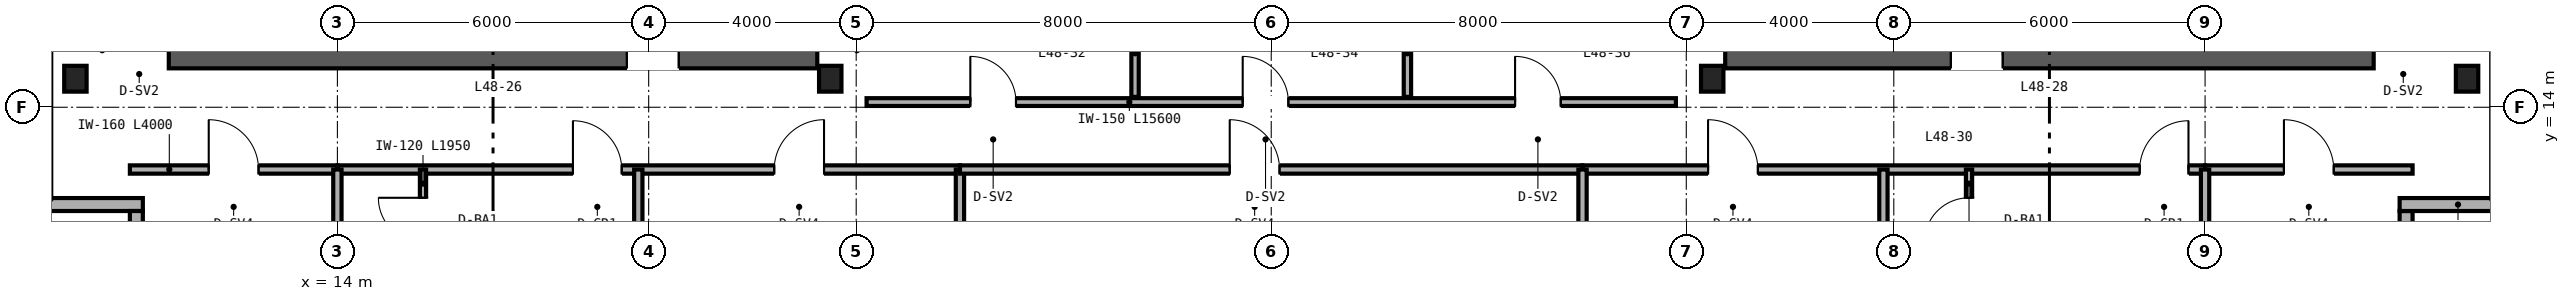
"""IFC4 building model, lengths in metres.
Left out: names, types, materials, properties, quantities, classifications, styles, units other than length and angle.
Written with IfcOpenShell. Run it as: python <this file> out.ifc"""

import sys

from ifc_helpers import new_model, si_unit, direction, frame, frame_2d, origin, origin_2d, place, context, subcontext, project, spatial, rectangle, i_section, extrude, source, transform, mapped, element, fill, save


model = new_model("IFC4")
c1 = context("Model", 3, precision=1e-05, world=origin(), true_north=direction((0.0, 1.0)))
c2 = subcontext(c1, "Body", "Model", "MODEL_VIEW")
j1 = project(units=[si_unit("LENGTHUNIT", "METRE"), si_unit("PLANEANGLEUNIT", "RADIAN")], contexts=[c1])
p1 = place(None, origin())
s1 = spatial("IfcSite", under=j1, at=p1, CompositionType="ELEMENT")
p2 = place(p1, origin())
s2 = spatial("IfcBuilding", under=s1, at=p2, CompositionType="ELEMENT")
p3 = place(p2, frame((0.0, 0.0, 192.0)))
s3 = spatial("IfcBuildingStorey", under=s2, at=p3, CompositionType="ELEMENT", Elevation=192.0)
p4 = place(p3, frame((10.75, 15.0, 0.0), z_axis=(0.0, 0.0, 1.0), x_axis=(1.0, 0.0, 0.0)))
e1 = element("IfcWall", 1, at=p4, inside=s3, PredefinedType="SHEAR", context=c2, shape_type="SweptSolid", body=[
    extrude(rectangle(XDim=12.5, YDim=0.5, at=frame_2d((6.25, 0.0))), origin(), (0.0, 0.0, 1.0), 3.37),
])
p5 = place(p4, frame((8.83, 0.0, 0.0)))
e2 = element("IfcOpeningElement", 2, at=p5, cuts=e1, PredefinedType="OPENING", context=c2, shape_type="SweptSolid", body=[
    extrude(rectangle(XDim=1.0, YDim=2.15, at=frame_2d((0.5, 1.075))), frame((0.0, 0.26, 0.0), z_axis=(0.0, -1.0, 0.0), x_axis=(1.0, 0.0, 0.0)), (0.0, 0.0, 1.0), 0.52),
])
p6 = place(p3, frame((40.75, 15.0, 0.0), z_axis=(0.0, 0.0, 1.0), x_axis=(1.0, 0.0, 0.0)))
e3 = element("IfcWall", 3, at=p6, inside=s3, PredefinedType="SHEAR", context=c2, shape_type="SweptSolid", body=[
    extrude(rectangle(XDim=12.5, YDim=0.5, at=frame_2d((6.25, 0.0))), origin(), (0.0, 0.0, 1.0), 3.37),
])
p7 = place(p6, frame((4.35, 0.0, 0.0)))
e4 = element("IfcOpeningElement", 4, at=p7, cuts=e3, PredefinedType="OPENING", context=c2, shape_type="SweptSolid", body=[
    extrude(rectangle(XDim=1.0, YDim=2.15, at=frame_2d((0.5, 1.075))), frame((0.0, 0.26, 0.0), z_axis=(0.0, -1.0, 0.0), x_axis=(1.0, 0.0, 0.0)), (0.0, 0.0, 1.0), 0.52),
])
m1 = source(origin(), c2, "Body", "SweptSolid", [
    extrude(i_section(OverallWidth=0.432, OverallDepth=0.498, WebThickness=0.056, FlangeThickness=0.089, FilletRadius=0.025, at=origin_2d()), origin(), (0.0, 0.0, 1.0), 3.37),
])
for number, where, z_axis, x_axis in (
    (5, (8.95, 14.55, 0.0), (0.0, 0.0, 1.0), (1.0, 0.0, 0.0)),
    (6, (23.5, 14.55, 0.0), (0.0, 0.0, 1.0), (1.0, 0.0, 0.0)),
    (7, (40.5, 14.55, 0.0), (0.0, 0.0, 1.0), (1.0, 0.0, 0.0)),
    (8, (55.05, 14.55, 0.0), (0.0, 0.0, 1.0), (1.0, 0.0, 0.0)),
):
    element("IfcColumn", number, at=place(p3, frame(where, z_axis=z_axis, x_axis=x_axis)), inside=s3, PredefinedType="COLUMN", context=c2, shape_type="MappedRepresentation", body=[
        mapped(m1, transform((0.0, 0.0, 0.0), scale=1.0)),
    ])
p8 = place(p3, frame((53.875, 10.0, 0.0), z_axis=(0.0, 0.0, 1.0), x_axis=(0.0, 1.0, 0.0)))
e9 = element("IfcWall", 9, at=p8, inside=s3, PredefinedType="SOLIDWALL", context=c2, shape_type="SweptSolid", body=[
    extrude(rectangle(XDim=2.0, YDim=0.25, at=frame_2d((1.0, 0.0))), origin(), (0.0, 0.0, 1.0), 3.37),
])
for number, where, z_axis, x_axis in (
    (10, (53.75, 12.125, 0.0), (0.0, 0.0, 1.0), (1.0, 0.0, 0.0)),
    (11, (8.0, 12.125, 0.0), (0.0, 0.0, 1.0), (1.0, 0.0, 0.0)),
):
    element("IfcWall", number, at=place(p3, frame(where, z_axis=z_axis, x_axis=x_axis)), inside=s3, PredefinedType="SOLIDWALL", context=c2, shape_type="SweptSolid", body=[
        extrude(rectangle(XDim=2.25, YDim=0.25, at=frame_2d((1.125, 0.0))), origin(), (0.0, 0.0, 1.0), 3.37),
    ])
p9 = place(p3, frame((10.125, 12.0, 0.0), z_axis=(0.0, 0.0, 1.0), x_axis=(0.0, -1.0, 0.0)))
e12 = element("IfcWall", 12, at=p9, inside=s3, PredefinedType="SOLIDWALL", context=c2, shape_type="SweptSolid", body=[
    extrude(rectangle(XDim=2.0, YDim=0.25, at=frame_2d((1.0, 0.0))), origin(), (0.0, 0.0, 1.0), 3.37),
])
p10 = place(p3, frame((24.2, 14.1, 0.0), z_axis=(0.0, 0.0, 1.0), x_axis=(1.0, 0.0, 0.0)))
e13 = element("IfcWall", 13, at=p10, inside=s3, PredefinedType="PARTITIONING", context=c2, shape_type="SweptSolid", body=[
    extrude(rectangle(XDim=15.6, YDim=0.15, at=frame_2d((7.8, 0.0))), origin(), (0.0, 0.0, 1.0), 3.37),
])
p11 = place(p10, frame((2.0, 0.0, 0.0)))
e14 = element("IfcOpeningElement", 14, at=p11, cuts=e13, PredefinedType="OPENING", context=c2, shape_type="SweptSolid", body=[
    extrude(rectangle(XDim=0.88, YDim=2.15, at=frame_2d((0.44, 1.075))), frame((0.0, 0.085, 0.0), z_axis=(0.0, -1.0, 0.0), x_axis=(1.0, 0.0, 0.0)), (0.0, 0.0, 1.0), 0.17),
])
p12 = place(p10, frame((7.25, 0.0, 0.0)))
e15 = element("IfcOpeningElement", 15, at=p12, cuts=e13, PredefinedType="OPENING", context=c2, shape_type="SweptSolid", body=[
    extrude(rectangle(XDim=0.88, YDim=2.15, at=frame_2d((0.44, 1.075))), frame((0.0, 0.085, 0.0), z_axis=(0.0, -1.0, 0.0), x_axis=(1.0, 0.0, 0.0)), (0.0, 0.0, 1.0), 0.17),
])
p13 = place(p10, frame((12.5, 0.0, 0.0)))
e16 = element("IfcOpeningElement", 16, at=p13, cuts=e13, PredefinedType="OPENING", context=c2, shape_type="SweptSolid", body=[
    extrude(rectangle(XDim=0.88, YDim=2.15, at=frame_2d((0.44, 1.075))), frame((0.0, 0.085, 0.0), z_axis=(0.0, -1.0, 0.0), x_axis=(1.0, 0.0, 0.0)), (0.0, 0.0, 1.0), 0.17),
])
for number, where, z_axis, x_axis in (
    (17, (29.375, 14.2, 0.0), (0.0, 0.0, 1.0), (0.0, 1.0, 0.0)),
    (18, (34.625, 14.2, 0.0), (0.0, 0.0, 1.0), (0.0, 1.0, 0.0)),
):
    element("IfcWall", number, at=place(p3, frame(where, z_axis=z_axis, x_axis=x_axis)), inside=s3, PredefinedType="PARTITIONING", context=c2, shape_type="SweptSolid", body=[
        extrude(rectangle(XDim=1.68, YDim=0.142, at=frame_2d((0.84, 0.0))), origin(), (0.0, 0.0, 1.0), 3.37),
    ])
p14 = place(p3, frame((10.0, 12.8, 0.0), z_axis=(0.0, 0.0, 1.0), x_axis=(1.0, 0.0, 0.0)))
e19 = element("IfcWall", 19, at=p14, inside=s3, PredefinedType="PARTITIONING", context=c2, shape_type="SweptSolid", body=[
    extrude(rectangle(XDim=4.0, YDim=0.16, at=frame_2d((2.0, 0.0))), origin(), (0.0, 0.0, 1.0), 3.37),
])
p15 = place(p14, frame((1.52, 0.0, 0.0)))
e20 = element("IfcOpeningElement", 20, at=p15, cuts=e19, PredefinedType="OPENING", context=c2, shape_type="SweptSolid", body=[
    extrude(rectangle(XDim=0.96, YDim=2.15, at=frame_2d((0.48, 1.075))), frame((0.0, 0.09, 0.0), z_axis=(0.0, -1.0, 0.0), x_axis=(1.0, 0.0, 0.0)), (0.0, 0.0, 1.0), 0.18),
])
p16 = place(p3, frame((50.0, 12.8, 0.0), z_axis=(0.0, 0.0, 1.0), x_axis=(1.0, 0.0, 0.0)))
e21 = element("IfcWall", 21, at=p16, inside=s3, PredefinedType="PARTITIONING", context=c2, shape_type="SweptSolid", body=[
    extrude(rectangle(XDim=4.0, YDim=0.16, at=frame_2d((2.0, 0.0))), origin(), (0.0, 0.0, 1.0), 3.37),
])
p17 = place(p16, frame((1.52, 0.0, 0.0)))
e22 = element("IfcOpeningElement", 22, at=p17, cuts=e21, PredefinedType="OPENING", context=c2, shape_type="SweptSolid", body=[
    extrude(rectangle(XDim=0.96, YDim=2.15, at=frame_2d((0.48, 1.075))), frame((0.0, 0.09, 0.0), z_axis=(0.0, -1.0, 0.0), x_axis=(1.0, 0.0, 0.0)), (0.0, 0.0, 1.0), 0.18),
])
p18 = place(p3, frame((14.0, 12.8, 0.0), z_axis=(0.0, 0.0, 1.0), x_axis=(1.0, 0.0, 0.0)))
e23 = element("IfcWall", 23, at=p18, inside=s3, PredefinedType="PARTITIONING", context=c2, shape_type="SweptSolid", body=[
    extrude(rectangle(XDim=12.0, YDim=0.16, at=frame_2d((6.0, 0.0))), origin(), (0.0, 0.0, 1.0), 2.913),
])
p19 = place(p18, frame((4.54, 0.0, 0.0)))
e24 = element("IfcOpeningElement", 24, at=p19, cuts=e23, PredefinedType="OPENING", context=c2, shape_type="SweptSolid", body=[
    extrude(rectangle(XDim=0.94, YDim=2.15, at=frame_2d((0.47, 1.075))), frame((0.0, 0.09, 0.0), z_axis=(0.0, -1.0, 0.0), x_axis=(1.0, 0.0, 0.0)), (0.0, 0.0, 1.0), 0.18),
])
p20 = place(p18, frame((8.42, 0.0, 0.0)))
e25 = element("IfcOpeningElement", 25, at=p20, cuts=e23, PredefinedType="OPENING", context=c2, shape_type="SweptSolid", body=[
    extrude(rectangle(XDim=0.96, YDim=2.15, at=frame_2d((0.48, 1.075))), frame((0.0, 0.09, 0.0), z_axis=(0.0, -1.0, 0.0), x_axis=(1.0, 0.0, 0.0)), (0.0, 0.0, 1.0), 0.18),
])
p21 = place(p3, frame((14.0, 6.36, 0.0), z_axis=(0.0, 0.0, 1.0), x_axis=(0.0, 1.0, 0.0)))
e26 = element("IfcWall", 26, at=p21, inside=s3, PredefinedType="PARTITIONING", context=c2, shape_type="SweptSolid", body=[
    extrude(rectangle(XDim=6.44, YDim=0.16, at=frame_2d((3.22, 0.0))), origin(), (0.0, 0.0, 1.0), 2.677),
])
p22 = place(p3, frame((26.0, 6.36, 0.0), z_axis=(0.0, 0.0, 1.0), x_axis=(0.0, 1.0, 0.0)))
e27 = element("IfcWall", 27, at=p22, inside=s3, PredefinedType="PARTITIONING", context=c2, shape_type="SweptSolid", body=[
    extrude(rectangle(XDim=6.44, YDim=0.16, at=frame_2d((3.22, 0.0))), origin(), (0.0, 0.0, 1.0), 2.443),
])
p23 = place(p3, frame((19.8, 6.36, 0.0), z_axis=(0.0, 0.0, 1.0), x_axis=(0.0, 1.0, 0.0)))
e28 = element("IfcWall", 28, at=p23, inside=s3, PredefinedType="PARTITIONING", context=c2, shape_type="SweptSolid", body=[
    extrude(rectangle(XDim=6.44, YDim=0.16, at=frame_2d((3.22, 0.0))), origin(), (0.0, 0.0, 1.0), 2.677),
])
p24 = place(p3, frame((15.65, 10.85, 0.0), z_axis=(0.0, 0.0, 1.0), x_axis=(0.0, 1.0, 0.0)))
e29 = element("IfcWall", 29, at=p24, inside=s3, PredefinedType="PARTITIONING", context=c2, shape_type="SweptSolid", body=[
    extrude(rectangle(XDim=1.95, YDim=0.12, at=frame_2d((0.975, 0.0))), origin(), (0.0, 0.0, 1.0), 3.37),
])
p25 = place(p24, frame((0.545, 0.0, 0.0)))
e30 = element("IfcOpeningElement", 30, at=p25, cuts=e29, PredefinedType="OPENING", context=c2, shape_type="SweptSolid", body=[
    extrude(rectangle(XDim=0.86, YDim=2.1, at=frame_2d((0.43, 1.05))), frame((0.0, 0.07, 0.0), z_axis=(0.0, -1.0, 0.0), x_axis=(1.0, 0.0, 0.0)), (0.0, 0.0, 1.0), 0.14),
])
p26 = place(p3, frame((26.0, 12.8, 0.0), z_axis=(0.0, 0.0, 1.0), x_axis=(1.0, 0.0, 0.0)))
e31 = element("IfcWall", 31, at=p26, inside=s3, PredefinedType="PARTITIONING", context=c2, shape_type="SweptSolid", body=[
    extrude(rectangle(XDim=12.0, YDim=0.16, at=frame_2d((6.0, 0.0))), origin(), (0.0, 0.0, 1.0), 3.37),
])
p27 = place(p26, frame((5.2, 0.0, 0.0)))
e32 = element("IfcOpeningElement", 32, at=p27, cuts=e31, PredefinedType="OPENING", context=c2, shape_type="SweptSolid", body=[
    extrude(rectangle(XDim=0.96, YDim=2.15, at=frame_2d((0.48, 1.075))), frame((0.0, 0.09, 0.0), z_axis=(0.0, -1.0, 0.0), x_axis=(1.0, 0.0, 0.0)), (0.0, 0.0, 1.0), 0.18),
])
p28 = place(p3, frame((38.0, 12.8, 0.0), z_axis=(0.0, 0.0, 1.0), x_axis=(1.0, 0.0, 0.0)))
e33 = element("IfcWall", 33, at=p28, inside=s3, PredefinedType="PARTITIONING", context=c2, shape_type="SweptSolid", body=[
    extrude(rectangle(XDim=12.0, YDim=0.16, at=frame_2d((6.0, 0.0))), origin(), (0.0, 0.0, 1.0), 2.913),
])
p29 = place(p28, frame((2.42, 0.0, 0.0)))
e34 = element("IfcOpeningElement", 34, at=p29, cuts=e33, PredefinedType="OPENING", context=c2, shape_type="SweptSolid", body=[
    extrude(rectangle(XDim=0.96, YDim=2.15, at=frame_2d((0.48, 1.075))), frame((0.0, 0.09, 0.0), z_axis=(0.0, -1.0, 0.0), x_axis=(1.0, 0.0, 0.0)), (0.0, 0.0, 1.0), 0.18),
])
p30 = place(p28, frame((10.74, 0.0, 0.0)))
e35 = element("IfcOpeningElement", 35, at=p30, cuts=e33, PredefinedType="OPENING", context=c2, shape_type="SweptSolid", body=[
    extrude(rectangle(XDim=0.94, YDim=2.15, at=frame_2d((0.47, 1.075))), frame((0.0, 0.09, 0.0), z_axis=(0.0, -1.0, 0.0), x_axis=(1.0, 0.0, 0.0)), (0.0, 0.0, 1.0), 0.18),
])
p31 = place(p3, frame((38.0, 6.36, 0.0), z_axis=(0.0, 0.0, 1.0), x_axis=(0.0, 1.0, 0.0)))
e36 = element("IfcWall", 36, at=p31, inside=s3, PredefinedType="PARTITIONING", context=c2, shape_type="SweptSolid", body=[
    extrude(rectangle(XDim=6.44, YDim=0.16, at=frame_2d((3.22, 0.0))), origin(), (0.0, 0.0, 1.0), 2.443),
])
for number, where, z_axis, x_axis in (
    (37, (50.0, 6.36, 0.0), (0.0, 0.0, 1.0), (0.0, 1.0, 0.0)),
    (38, (43.8, 6.36, 0.0), (0.0, 0.0, 1.0), (0.0, 1.0, 0.0)),
):
    element("IfcWall", number, at=place(p3, frame(where, z_axis=z_axis, x_axis=x_axis)), inside=s3, PredefinedType="PARTITIONING", context=c2, shape_type="SweptSolid", body=[
        extrude(rectangle(XDim=6.44, YDim=0.16, at=frame_2d((3.22, 0.0))), origin(), (0.0, 0.0, 1.0), 2.677),
    ])
p32 = place(p3, frame((45.45, 10.85, 0.0), z_axis=(0.0, 0.0, 1.0), x_axis=(0.0, 1.0, 0.0)))
e39 = element("IfcWall", 39, at=p32, inside=s3, PredefinedType="PARTITIONING", context=c2, shape_type="SweptSolid", body=[
    extrude(rectangle(XDim=1.95, YDim=0.12, at=frame_2d((0.975, 0.0))), origin(), (0.0, 0.0, 1.0), 3.37),
])
p33 = place(p32, frame((0.545, 0.0, 0.0)))
e40 = element("IfcOpeningElement", 40, at=p33, cuts=e39, PredefinedType="OPENING", context=c2, shape_type="SweptSolid", body=[
    extrude(rectangle(XDim=0.86, YDim=2.1, at=frame_2d((0.43, 1.05))), frame((0.0, 0.07, 0.0), z_axis=(0.0, -1.0, 0.0), x_axis=(1.0, 0.0, 0.0)), (0.0, 0.0, 1.0), 0.14),
])
m2 = source(origin(), c2, "Body", "SweptSolid", [
    extrude(rectangle(XDim=1.0, YDim=2.15, at=frame_2d((0.5, 1.075))), frame((0.0, 0.025, 0.0), z_axis=(0.0, -1.0, 0.0), x_axis=(1.0, 0.0, 0.0)), (0.0, 0.0, 1.0), 0.05),
])
p34 = place(p5, origin())
e41 = element("IfcDoor", 41, at=p34, inside=s3, OperationType="SINGLE_SWING_LEFT", PredefinedType="DOOR", context=c2, shape_type="MappedRepresentation", body=[
    mapped(m2, transform((0.0, 0.0, 0.0), scale=1.0)),
])
fill(e2, e41)
p35 = place(p7, origin())
e42 = element("IfcDoor", 42, at=p35, inside=s3, OperationType="SINGLE_SWING_RIGHT", PredefinedType="DOOR", context=c2, shape_type="MappedRepresentation", body=[
    mapped(m2, transform((0.0, 0.0, 0.0), scale=1.0)),
])
fill(e4, e42)
m3 = source(origin(), c2, "Body", "SweptSolid", [
    extrude(rectangle(XDim=0.88, YDim=2.15, at=frame_2d((0.44, 1.075))), frame((0.0, 0.025, 0.0), z_axis=(0.0, -1.0, 0.0), x_axis=(1.0, 0.0, 0.0)), (0.0, 0.0, 1.0), 0.05),
])
p36 = place(p11, origin())
e43 = element("IfcDoor", 43, at=p36, inside=s3, OperationType="SINGLE_SWING_LEFT", PredefinedType="DOOR", context=c2, shape_type="MappedRepresentation", body=[
    mapped(m3, transform((0.0, 0.0, 0.0), scale=1.0)),
])
fill(e14, e43)
p37 = place(p12, origin())
e44 = element("IfcDoor", 44, at=p37, inside=s3, OperationType="SINGLE_SWING_LEFT", PredefinedType="DOOR", context=c2, shape_type="MappedRepresentation", body=[
    mapped(m3, transform((0.0, 0.0, 0.0), scale=1.0)),
])
fill(e15, e44)
p38 = place(p13, origin())
e45 = element("IfcDoor", 45, at=p38, inside=s3, OperationType="SINGLE_SWING_LEFT", PredefinedType="DOOR", context=c2, shape_type="MappedRepresentation", body=[
    mapped(m3, transform((0.0, 0.0, 0.0), scale=1.0)),
])
fill(e16, e45)
m4 = source(origin(), c2, "Body", "SweptSolid", [
    extrude(rectangle(XDim=0.96, YDim=2.15, at=frame_2d((0.48, 1.075))), frame((0.0, 0.025, 0.0), z_axis=(0.0, -1.0, 0.0), x_axis=(1.0, 0.0, 0.0)), (0.0, 0.0, 1.0), 0.05),
])
p39 = place(p15, origin())
e46 = element("IfcDoor", 46, at=p39, inside=s3, OperationType="SINGLE_SWING_LEFT", PredefinedType="DOOR", context=c2, shape_type="MappedRepresentation", body=[
    mapped(m4, transform((0.0, 0.0, 0.0), scale=1.0)),
])
fill(e20, e46)
p40 = place(p17, origin())
e47 = element("IfcDoor", 47, at=p40, inside=s3, OperationType="SINGLE_SWING_LEFT", PredefinedType="DOOR", context=c2, shape_type="MappedRepresentation", body=[
    mapped(m4, transform((0.0, 0.0, 0.0), scale=1.0)),
])
fill(e22, e47)
m5 = source(origin(), c2, "Body", "SweptSolid", [
    extrude(rectangle(XDim=0.86, YDim=2.1, at=frame_2d((0.43, 1.05))), frame((0.0, 0.025, 0.0), z_axis=(0.0, -1.0, 0.0), x_axis=(1.0, 0.0, 0.0)), (0.0, 0.0, 1.0), 0.05),
])
p41 = place(p25, origin())
e48 = element("IfcDoor", 48, at=p41, inside=s3, OperationType="SINGLE_SWING_RIGHT", PredefinedType="DOOR", context=c2, shape_type="MappedRepresentation", body=[
    mapped(m5, transform((0.0, 0.0, 0.0), scale=1.0)),
])
fill(e30, e48)
m6 = source(origin(), c2, "Body", "SweptSolid", [
    extrude(rectangle(XDim=0.94, YDim=2.15, at=frame_2d((0.47, 1.075))), frame((0.0, 0.025, 0.0), z_axis=(0.0, -1.0, 0.0), x_axis=(1.0, 0.0, 0.0)), (0.0, 0.0, 1.0), 0.05),
])
p42 = place(p19, origin())
e49 = element("IfcDoor", 49, at=p42, inside=s3, OperationType="SINGLE_SWING_LEFT", PredefinedType="DOOR", context=c2, shape_type="MappedRepresentation", body=[
    mapped(m6, transform((0.0, 0.0, 0.0), scale=1.0)),
])
fill(e24, e49)
p43 = place(p20, origin())
e50 = element("IfcDoor", 50, at=p43, inside=s3, OperationType="SINGLE_SWING_RIGHT", PredefinedType="DOOR", context=c2, shape_type="MappedRepresentation", body=[
    mapped(m4, transform((0.0, 0.0, 0.0), scale=1.0)),
])
fill(e25, e50)
p44 = place(p27, origin())
e51 = element("IfcDoor", 51, at=p44, inside=s3, OperationType="SINGLE_SWING_LEFT", PredefinedType="DOOR", context=c2, shape_type="MappedRepresentation", body=[
    mapped(m4, transform((0.0, 0.0, 0.0), scale=1.0)),
])
fill(e32, e51)
p45 = place(p33, origin())
e52 = element("IfcDoor", 52, at=p45, inside=s3, OperationType="SINGLE_SWING_LEFT", PredefinedType="DOOR", context=c2, shape_type="MappedRepresentation", body=[
    mapped(m5, transform((0.0, 0.0, 0.0), scale=1.0)),
])
fill(e40, e52)
p46 = place(p29, origin())
e53 = element("IfcDoor", 53, at=p46, inside=s3, OperationType="SINGLE_SWING_LEFT", PredefinedType="DOOR", context=c2, shape_type="MappedRepresentation", body=[
    mapped(m4, transform((0.0, 0.0, 0.0), scale=1.0)),
])
fill(e34, e53)
p47 = place(p30, origin())
e54 = element("IfcDoor", 54, at=p47, inside=s3, OperationType="SINGLE_SWING_RIGHT", PredefinedType="DOOR", context=c2, shape_type="MappedRepresentation", body=[
    mapped(m6, transform((0.0, 0.0, 0.0), scale=1.0)),
])
fill(e35, e54)
save(model, sys.argv[1])
